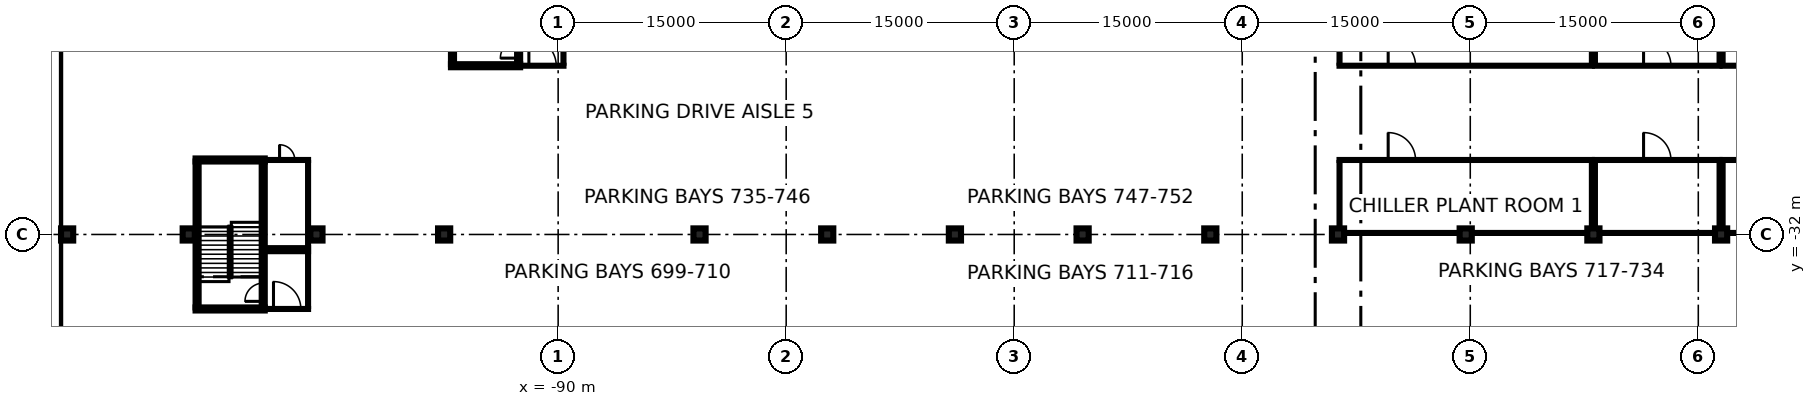
"""IFC4 building model, lengths in metres.
Left out: names, types, materials, properties, quantities, classifications, styles, units other than length and angle.
Written with IfcOpenShell. Run it as: python <this file> out.ifc"""

import sys

from ifc_helpers import new_model, si_unit, direction, frame, frame_2d, origin, origin_2d, place, context, subcontext, project, spatial, rectangle, extrude, element, fill, save


model = new_model("IFC4")
c1 = context("Model", 3, precision=1e-05, world=origin(), true_north=direction((0.0, 1.0)))
c2 = subcontext(c1, "Body", "Model", "MODEL_VIEW")
j1 = project(units=[si_unit("LENGTHUNIT", "METRE"), si_unit("PLANEANGLEUNIT", "RADIAN")], contexts=[c1])
p1 = place(None, origin())
s1 = spatial("IfcSite", under=j1, at=p1, CompositionType="ELEMENT")
p2 = place(p1, origin())
s2 = spatial("IfcBuilding", under=s1, at=p2, CompositionType="ELEMENT")
p3 = place(p2, frame((0.0, 0.0, -12.0)))
s3 = spatial("IfcBuildingStorey", under=s2, at=p3, CompositionType="ELEMENT", Elevation=-12.0)
p4 = place(p3, frame((-123.15, -80.0, 0.0), z_axis=(0.0, 0.0, 1.0), x_axis=(0.0, 1.0, 0.0)))
e1 = element("IfcWall", 1, at=p4, inside=s3, PredefinedType="USERDEFINED", context=c2, shape_type="SweptSolid", body=[
    extrude(rectangle(XDim=160.0, YDim=0.9, at=frame_2d((80.0, 0.0))), origin(), (0.0, 0.0, 1.0), 11.55),
])
p5 = place(p2, frame((0.0, 0.0, -7.2)))
s4 = spatial("IfcBuildingStorey", under=s2, at=p5, CompositionType="ELEMENT", Elevation=-7.2)
for number, where, z_axis, x_axis in (
    (2, (-122.3, -32.0, -0.4), (0.0, 0.0, 1.0), (1.0, 0.0, 0.0)),
    (3, (-114.3, -32.0, -0.4), (0.0, 0.0, 1.0), (1.0, 0.0, 0.0)),
    (4, (-105.9, -32.0, -0.4), (0.0, 0.0, 1.0), (1.0, 0.0, 0.0)),
    (5, (-97.5, -32.0, -0.4), (0.0, 0.0, 1.0), (1.0, 0.0, 0.0)),
    (6, (-80.7, -32.0, -0.4), (0.0, 0.0, 1.0), (1.0, 0.0, 0.0)),
    (7, (-72.3, -32.0, -0.4), (0.0, 0.0, 1.0), (1.0, 0.0, 0.0)),
    (8, (-63.9, -32.0, -0.4), (0.0, 0.0, 1.0), (1.0, 0.0, 0.0)),
    (9, (-55.5, -32.0, -0.4), (0.0, 0.0, 1.0), (1.0, 0.0, 0.0)),
    (10, (-47.1, -32.0, -0.4), (0.0, 0.0, 1.0), (1.0, 0.0, 0.0)),
    (11, (-38.7, -32.0, -0.4), (0.0, 0.0, 1.0), (1.0, 0.0, 0.0)),
    (12, (-30.3, -32.0, -0.4), (0.0, 0.0, 1.0), (1.0, 0.0, 0.0)),
    (13, (-21.9, -32.0, -0.4), (0.0, 0.0, 1.0), (1.0, 0.0, 0.0)),
    (14, (-13.5, -32.0, -0.4), (0.0, 0.0, 1.0), (1.0, 0.0, 0.0)),
):
    element("IfcColumn", number, at=place(p5, frame(where, z_axis=z_axis, x_axis=x_axis)), inside=s4, PredefinedType="COLUMN", context=c2, shape_type="SweptSolid", body=[
        extrude(rectangle(XDim=0.8, YDim=0.8, at=origin_2d()), origin(), (0.0, 0.0, 1.0), 3.6),
    ])
p6 = place(p5, frame((-38.7, -31.9, 0.0), z_axis=(0.0, 0.0, 1.0), x_axis=(1.0, 0.0, 0.0)))
e15 = element("IfcWall", 15, at=p6, inside=s4, PredefinedType="PARTITIONING", context=c2, shape_type="SweptSolid", body=[
    extrude(rectangle(XDim=16.8, YDim=0.2, at=frame_2d((8.4, 0.0))), origin(), (0.0, 0.0, 1.0), 3.2),
])
p7 = place(p5, frame((-38.7, -27.1, 0.0), z_axis=(0.0, 0.0, 1.0), x_axis=(1.0, 0.0, 0.0)))
e16 = element("IfcWall", 16, at=p7, inside=s4, PredefinedType="PARTITIONING", context=c2, shape_type="SweptSolid", body=[
    extrude(rectangle(XDim=16.8, YDim=0.2, at=frame_2d((8.4, 0.0))), origin(), (0.0, 0.0, 1.0), 3.2),
])
p8 = place(p7, frame((3.3, 0.0, 0.0)))
e17 = element("IfcOpeningElement", 17, at=p8, cuts=e16, PredefinedType="OPENING", context=c2, shape_type="SweptSolid", body=[
    extrude(rectangle(XDim=1.8, YDim=2.1, at=frame_2d((0.9, 1.05))), frame((0.0, 0.11, 0.0), z_axis=(0.0, -1.0, 0.0), x_axis=(1.0, 0.0, 0.0)), (0.0, 0.0, 1.0), 0.22),
])
for number, where, z_axis, x_axis in (
    (18, (-38.6, -31.6, 0.0), (0.0, 0.0, 1.0), (0.0, 1.0, 0.0)),
    (19, (-22.0, -31.6, 0.0), (0.0, 0.0, 1.0), (0.0, 1.0, 0.0)),
):
    element("IfcWall", number, at=place(p5, frame(where, z_axis=z_axis, x_axis=x_axis)), inside=s4, PredefinedType="PARTITIONING", context=c2, shape_type="SweptSolid", body=[
        extrude(rectangle(XDim=4.4, YDim=0.2, at=frame_2d((2.2, 0.0))), origin(), (0.0, 0.0, 1.0), 3.2),
    ])
p9 = place(p5, frame((-21.9, -31.9, 0.0), z_axis=(0.0, 0.0, 1.0), x_axis=(1.0, 0.0, 0.0)))
e20 = element("IfcWall", 20, at=p9, inside=s4, PredefinedType="PARTITIONING", context=c2, shape_type="SweptSolid", body=[
    extrude(rectangle(XDim=8.4, YDim=0.2, at=frame_2d((4.2, 0.0))), origin(), (0.0, 0.0, 1.0), 3.2),
])
p10 = place(p5, frame((-21.9, -27.1, 0.0), z_axis=(0.0, 0.0, 1.0), x_axis=(1.0, 0.0, 0.0)))
e21 = element("IfcWall", 21, at=p10, inside=s4, PredefinedType="PARTITIONING", context=c2, shape_type="SweptSolid", body=[
    extrude(rectangle(XDim=8.4, YDim=0.2, at=frame_2d((4.2, 0.0))), origin(), (0.0, 0.0, 1.0), 3.2),
])
p11 = place(p10, frame((3.3, 0.0, 0.0)))
e22 = element("IfcOpeningElement", 22, at=p11, cuts=e21, PredefinedType="OPENING", context=c2, shape_type="SweptSolid", body=[
    extrude(rectangle(XDim=1.8, YDim=2.1, at=frame_2d((0.9, 1.05))), frame((0.0, 0.11, 0.0), z_axis=(0.0, -1.0, 0.0), x_axis=(1.0, 0.0, 0.0)), (0.0, 0.0, 1.0), 0.22),
])
for number, where, z_axis, x_axis in (
    (23, (-21.8, -31.6, 0.0), (0.0, 0.0, 1.0), (0.0, 1.0, 0.0)),
    (24, (-13.6, -31.6, 0.0), (0.0, 0.0, 1.0), (0.0, 1.0, 0.0)),
):
    element("IfcWall", number, at=place(p5, frame(where, z_axis=z_axis, x_axis=x_axis)), inside=s4, PredefinedType="PARTITIONING", context=c2, shape_type="SweptSolid", body=[
        extrude(rectangle(XDim=4.4, YDim=0.2, at=frame_2d((2.2, 0.0))), origin(), (0.0, 0.0, 1.0), 3.2),
    ])
p12 = place(p5, frame((-13.5, -31.9, 0.0), z_axis=(0.0, 0.0, 1.0), x_axis=(1.0, 0.0, 0.0)))
e25 = element("IfcWall", 25, at=p12, inside=s4, PredefinedType="PARTITIONING", context=c2, shape_type="SweptSolid", body=[
    extrude(rectangle(XDim=25.2, YDim=0.2, at=frame_2d((12.6, 0.0))), origin(), (0.0, 0.0, 1.0), 3.2),
])
p13 = place(p5, frame((-13.5, -27.1, 0.0), z_axis=(0.0, 0.0, 1.0), x_axis=(1.0, 0.0, 0.0)))
e26 = element("IfcWall", 26, at=p13, inside=s4, PredefinedType="PARTITIONING", context=c2, shape_type="SweptSolid", body=[
    extrude(rectangle(XDim=25.2, YDim=0.2, at=frame_2d((12.6, 0.0))), origin(), (0.0, 0.0, 1.0), 3.2),
])
p14 = place(p13, frame((3.3, 0.0, 0.0)))
e27 = element("IfcOpeningElement", 27, at=p14, cuts=e26, PredefinedType="OPENING", context=c2, shape_type="SweptSolid", body=[
    extrude(rectangle(XDim=1.8, YDim=2.1, at=frame_2d((0.9, 1.05))), frame((0.0, 0.11, 0.0), z_axis=(0.0, -1.0, 0.0), x_axis=(1.0, 0.0, 0.0)), (0.0, 0.0, 1.0), 0.22),
])
p15 = place(p5, frame((-13.4, -31.6, 0.0), z_axis=(0.0, 0.0, 1.0), x_axis=(0.0, 1.0, 0.0)))
e28 = element("IfcWall", 28, at=p15, inside=s4, PredefinedType="PARTITIONING", context=c2, shape_type="SweptSolid", body=[
    extrude(rectangle(XDim=4.4, YDim=0.2, at=frame_2d((2.2, 0.0))), origin(), (0.0, 0.0, 1.0), 3.2),
])
p16 = place(p5, frame((-38.7, -20.9, 0.0), z_axis=(0.0, 0.0, 1.0), x_axis=(1.0, 0.0, 0.0)))
e29 = element("IfcWall", 29, at=p16, inside=s4, PredefinedType="PARTITIONING", context=c2, shape_type="SweptSolid", body=[
    extrude(rectangle(XDim=16.8, YDim=0.2, at=frame_2d((8.4, 0.0))), origin(), (0.0, 0.0, 1.0), 3.2),
])
p17 = place(p16, frame((3.3, 0.0, 0.0)))
e30 = element("IfcOpeningElement", 30, at=p17, cuts=e29, PredefinedType="OPENING", context=c2, shape_type="SweptSolid", body=[
    extrude(rectangle(XDim=1.8, YDim=2.1, at=frame_2d((0.9, 1.05))), frame((0.0, 0.11, 0.0), z_axis=(0.0, -1.0, 0.0), x_axis=(1.0, 0.0, 0.0)), (0.0, 0.0, 1.0), 0.22),
])
for number, where, z_axis, x_axis in (
    (31, (-38.6, -20.8, 0.0), (0.0, 0.0, 1.0), (0.0, 1.0, 0.0)),
    (32, (-22.0, -20.8, 0.0), (0.0, 0.0, 1.0), (0.0, 1.0, 0.0)),
):
    element("IfcWall", number, at=place(p5, frame(where, z_axis=z_axis, x_axis=x_axis)), inside=s4, PredefinedType="PARTITIONING", context=c2, shape_type="SweptSolid", body=[
        extrude(rectangle(XDim=4.2, YDim=0.2, at=frame_2d((2.1, 0.0))), origin(), (0.0, 0.0, 1.0), 3.2),
    ])
p18 = place(p5, frame((-21.9, -20.9, 0.0), z_axis=(0.0, 0.0, 1.0), x_axis=(1.0, 0.0, 0.0)))
e33 = element("IfcWall", 33, at=p18, inside=s4, PredefinedType="PARTITIONING", context=c2, shape_type="SweptSolid", body=[
    extrude(rectangle(XDim=8.4, YDim=0.2, at=frame_2d((4.2, 0.0))), origin(), (0.0, 0.0, 1.0), 3.2),
])
p19 = place(p18, frame((3.3, 0.0, 0.0)))
e34 = element("IfcOpeningElement", 34, at=p19, cuts=e33, PredefinedType="OPENING", context=c2, shape_type="SweptSolid", body=[
    extrude(rectangle(XDim=1.8, YDim=2.1, at=frame_2d((0.9, 1.05))), frame((0.0, 0.11, 0.0), z_axis=(0.0, -1.0, 0.0), x_axis=(1.0, 0.0, 0.0)), (0.0, 0.0, 1.0), 0.22),
])
for number, where, z_axis, x_axis in (
    (35, (-21.8, -20.8, 0.0), (0.0, 0.0, 1.0), (0.0, 1.0, 0.0)),
    (36, (-13.6, -20.8, 0.0), (0.0, 0.0, 1.0), (0.0, 1.0, 0.0)),
):
    element("IfcWall", number, at=place(p5, frame(where, z_axis=z_axis, x_axis=x_axis)), inside=s4, PredefinedType="PARTITIONING", context=c2, shape_type="SweptSolid", body=[
        extrude(rectangle(XDim=4.2, YDim=0.2, at=frame_2d((2.1, 0.0))), origin(), (0.0, 0.0, 1.0), 3.2),
    ])
p20 = place(p5, frame((-13.5, -20.9, 0.0), z_axis=(0.0, 0.0, 1.0), x_axis=(1.0, 0.0, 0.0)))
e37 = element("IfcWall", 37, at=p20, inside=s4, PredefinedType="PARTITIONING", context=c2, shape_type="SweptSolid", body=[
    extrude(rectangle(XDim=8.4, YDim=0.2, at=frame_2d((4.2, 0.0))), origin(), (0.0, 0.0, 1.0), 3.2),
])
p21 = place(p20, frame((3.3, 0.0, 0.0)))
e38 = element("IfcOpeningElement", 38, at=p21, cuts=e37, PredefinedType="OPENING", context=c2, shape_type="SweptSolid", body=[
    extrude(rectangle(XDim=1.8, YDim=2.1, at=frame_2d((0.9, 1.05))), frame((0.0, 0.11, 0.0), z_axis=(0.0, -1.0, 0.0), x_axis=(1.0, 0.0, 0.0)), (0.0, 0.0, 1.0), 0.22),
])
p22 = place(p5, frame((-13.4, -20.8, 0.0), z_axis=(0.0, 0.0, 1.0), x_axis=(0.0, 1.0, 0.0)))
e39 = element("IfcWall", 39, at=p22, inside=s4, PredefinedType="PARTITIONING", context=c2, shape_type="SweptSolid", body=[
    extrude(rectangle(XDim=4.2, YDim=0.2, at=frame_2d((2.1, 0.0))), origin(), (0.0, 0.0, 1.0), 3.2),
])
p23 = place(p5, frame((-109.3, -36.9, 0.0), z_axis=(0.0, 0.0, 1.0), x_axis=(1.0, 0.0, 0.0)))
e40 = element("IfcWall", 40, at=p23, inside=s4, PredefinedType="PARTITIONING", context=c2, shape_type="SweptSolid", body=[
    extrude(rectangle(XDim=2.95, YDim=0.2, at=frame_2d((1.475, 0.0))), origin(), (0.0, 0.0, 1.0), 3.2),
])
p24 = place(p23, frame((0.575, 0.0, 0.0)))
e41 = element("IfcOpeningElement", 41, at=p24, cuts=e40, PredefinedType="OPENING", context=c2, shape_type="SweptSolid", body=[
    extrude(rectangle(XDim=1.8, YDim=2.1, at=frame_2d((0.9, 1.05))), frame((0.0, 0.11, 0.0), z_axis=(0.0, -1.0, 0.0), x_axis=(1.0, 0.0, 0.0)), (0.0, 0.0, 1.0), 0.22),
])
p25 = place(p5, frame((-109.3, -33.1, 0.0), z_axis=(0.0, 0.0, 1.0), x_axis=(1.0, 0.0, 0.0)))
e42 = element("IfcWall", 42, at=p25, inside=s4, PredefinedType="PARTITIONING", context=c2, shape_type="SweptSolid", body=[
    extrude(rectangle(XDim=2.95, YDim=0.2, at=frame_2d((1.475, 0.0))), origin(), (0.0, 0.0, 1.0), 3.2),
])
p26 = place(p5, frame((-106.45, -36.8, 0.0), z_axis=(0.0, 0.0, 1.0), x_axis=(0.0, 1.0, 0.0)))
e43 = element("IfcWall", 43, at=p26, inside=s4, PredefinedType="PARTITIONING", context=c2, shape_type="SweptSolid", body=[
    extrude(rectangle(XDim=3.6, YDim=0.2, at=frame_2d((1.8, 0.0))), origin(), (0.0, 0.0, 1.0), 3.2),
])
p27 = place(p5, frame((-109.3, -32.9, 0.0), z_axis=(0.0, 0.0, 1.0), x_axis=(1.0, 0.0, 0.0)))
e44 = element("IfcWall", 44, at=p27, inside=s4, PredefinedType="PARTITIONING", context=c2, shape_type="SweptSolid", body=[
    extrude(rectangle(XDim=2.95, YDim=0.2, at=frame_2d((1.475, 0.0))), origin(), (0.0, 0.0, 1.0), 3.2),
])
p28 = place(p5, frame((-109.3, -27.1, 0.0), z_axis=(0.0, 0.0, 1.0), x_axis=(1.0, 0.0, 0.0)))
e45 = element("IfcWall", 45, at=p28, inside=s4, PredefinedType="PARTITIONING", context=c2, shape_type="SweptSolid", body=[
    extrude(rectangle(XDim=2.95, YDim=0.2, at=frame_2d((1.475, 0.0))), origin(), (0.0, 0.0, 1.0), 3.2),
])
p29 = place(p28, frame((0.975, 0.0, 0.0)))
e46 = element("IfcOpeningElement", 46, at=p29, cuts=e45, PredefinedType="OPENING", context=c2, shape_type="SweptSolid", body=[
    extrude(rectangle(XDim=1.0, YDim=2.1, at=frame_2d((0.5, 1.05))), frame((0.0, 0.11, 0.0), z_axis=(0.0, -1.0, 0.0), x_axis=(1.0, 0.0, 0.0)), (0.0, 0.0, 1.0), 0.22),
])
p30 = place(p5, frame((-106.45, -32.8, 0.0), z_axis=(0.0, 0.0, 1.0), x_axis=(0.0, 1.0, 0.0)))
e47 = element("IfcWall", 47, at=p30, inside=s4, PredefinedType="PARTITIONING", context=c2, shape_type="SweptSolid", body=[
    extrude(rectangle(XDim=5.6, YDim=0.2, at=frame_2d((2.8, 0.0))), origin(), (0.0, 0.0, 1.0), 3.2),
])
p31 = place(p5, frame((-92.5, -20.9, 0.0), z_axis=(0.0, 0.0, 1.0), x_axis=(1.0, 0.0, 0.0)))
e48 = element("IfcWall", 48, at=p31, inside=s4, PredefinedType="PARTITIONING", context=c2, shape_type="SweptSolid", body=[
    extrude(rectangle(XDim=2.95, YDim=0.2, at=frame_2d((1.475, 0.0))), origin(), (0.0, 0.0, 1.0), 3.2),
])
p32 = place(p31, frame((0.575, 0.0, 0.0)))
e49 = element("IfcOpeningElement", 49, at=p32, cuts=e48, PredefinedType="OPENING", context=c2, shape_type="SweptSolid", body=[
    extrude(rectangle(XDim=1.8, YDim=2.1, at=frame_2d((0.9, 1.05))), frame((0.0, 0.11, 0.0), z_axis=(0.0, -1.0, 0.0), x_axis=(1.0, 0.0, 0.0)), (0.0, 0.0, 1.0), 0.22),
])
p33 = place(p5, frame((-89.65, -20.8, 0.0), z_axis=(0.0, 0.0, 1.0), x_axis=(0.0, 1.0, 0.0)))
e50 = element("IfcWall", 50, at=p33, inside=s4, PredefinedType="PARTITIONING", context=c2, shape_type="SweptSolid", body=[
    extrude(rectangle(XDim=3.6, YDim=0.2, at=frame_2d((1.8, 0.0))), origin(), (0.0, 0.0, 1.0), 3.2),
])
p34 = place(p5, frame((-113.75, -36.8, 0.0), z_axis=(0.0, 0.0, 1.0), x_axis=(0.0, 1.0, 0.0)))
e51 = element("IfcWall", 51, at=p34, inside=s4, PredefinedType="SOLIDWALL", context=c2, shape_type="SweptSolid", body=[
    extrude(rectangle(XDim=9.6, YDim=0.2, at=frame_2d((4.8, 0.0))), origin(), (0.0, 0.0, 1.0), 3.2),
])
p35 = place(p5, frame((-109.4, -36.8, 0.0), z_axis=(0.0, 0.0, 1.0), x_axis=(0.0, 1.0, 0.0)))
e52 = element("IfcWall", 52, at=p35, inside=s4, PredefinedType="SOLIDWALL", context=c2, shape_type="SweptSolid", body=[
    extrude(rectangle(XDim=9.6, YDim=0.2, at=frame_2d((4.8, 0.0))), origin(), (0.0, 0.0, 1.0), 3.2),
])
p36 = place(p35, frame((0.4, 0.0, 0.0)))
e53 = element("IfcOpeningElement", 53, at=p36, cuts=e52, PredefinedType="OPENING", context=c2, shape_type="SweptSolid", body=[
    extrude(rectangle(XDim=1.2, YDim=2.1, at=frame_2d((0.6, 1.05))), frame((0.0, 0.11, 0.0), z_axis=(0.0, -1.0, 0.0), x_axis=(1.0, 0.0, 0.0)), (0.0, 0.0, 1.0), 0.22),
])
for number, where, z_axis, x_axis in (
    (54, (-109.3, -36.9, 0.0), (0.0, 0.0, 1.0), (-1.0, 0.0, 0.0)),
    (55, (-113.85, -27.1, 0.0), (0.0, 0.0, 1.0), (1.0, 0.0, 0.0)),
):
    element("IfcWall", number, at=place(p5, frame(where, z_axis=z_axis, x_axis=x_axis)), inside=s4, PredefinedType="SOLIDWALL", context=c2, shape_type="SweptSolid", body=[
        extrude(rectangle(XDim=4.55, YDim=0.2, at=frame_2d((2.275, 0.0))), origin(), (0.0, 0.0, 1.0), 3.2),
    ])
p37 = place(p5, frame((-96.95, -20.8, 0.0), z_axis=(0.0, 0.0, 1.0), x_axis=(0.0, 1.0, 0.0)))
e56 = element("IfcWall", 56, at=p37, inside=s4, PredefinedType="SOLIDWALL", context=c2, shape_type="SweptSolid", body=[
    extrude(rectangle(XDim=9.6, YDim=0.2, at=frame_2d((4.8, 0.0))), origin(), (0.0, 0.0, 1.0), 3.2),
])
p38 = place(p5, frame((-92.6, -20.8, 0.0), z_axis=(0.0, 0.0, 1.0), x_axis=(0.0, 1.0, 0.0)))
e57 = element("IfcWall", 57, at=p38, inside=s4, PredefinedType="SOLIDWALL", context=c2, shape_type="SweptSolid", body=[
    extrude(rectangle(XDim=9.6, YDim=0.2, at=frame_2d((4.8, 0.0))), origin(), (0.0, 0.0, 1.0), 3.2),
])
p39 = place(p38, frame((0.4, 0.0, 0.0)))
e58 = element("IfcOpeningElement", 58, at=p39, cuts=e57, PredefinedType="OPENING", context=c2, shape_type="SweptSolid", body=[
    extrude(rectangle(XDim=1.2, YDim=2.1, at=frame_2d((0.6, 1.05))), frame((0.0, 0.11, 0.0), z_axis=(0.0, -1.0, 0.0), x_axis=(1.0, 0.0, 0.0)), (0.0, 0.0, 1.0), 0.22),
])
p40 = place(p5, frame((-92.5, -20.9, 0.0), z_axis=(0.0, 0.0, 1.0), x_axis=(-1.0, 0.0, 0.0)))
e59 = element("IfcWall", 59, at=p40, inside=s4, PredefinedType="SOLIDWALL", context=c2, shape_type="SweptSolid", body=[
    extrude(rectangle(XDim=4.55, YDim=0.2, at=frame_2d((2.275, 0.0))), origin(), (0.0, 0.0, 1.0), 3.2),
])
p41 = place(p8, origin())
e60 = element("IfcDoor", 60, at=p41, inside=s4, OperationType="DOUBLE_DOOR_SINGLE_SWING", PredefinedType="DOOR", context=c2, shape_type="SweptSolid", body=[
    extrude(rectangle(XDim=1.8, YDim=2.1, at=frame_2d((0.9, 1.05))), frame((0.0, 0.025, 0.0), z_axis=(0.0, -1.0, 0.0), x_axis=(1.0, 0.0, 0.0)), (0.0, 0.0, 1.0), 0.05),
])
fill(e17, e60)
p42 = place(p11, origin())
e61 = element("IfcDoor", 61, at=p42, inside=s4, OperationType="DOUBLE_DOOR_SINGLE_SWING", PredefinedType="DOOR", context=c2, shape_type="SweptSolid", body=[
    extrude(rectangle(XDim=1.8, YDim=2.1, at=frame_2d((0.9, 1.05))), frame((0.0, 0.025, 0.0), z_axis=(0.0, -1.0, 0.0), x_axis=(1.0, 0.0, 0.0)), (0.0, 0.0, 1.0), 0.05),
])
fill(e22, e61)
p43 = place(p17, origin())
e62 = element("IfcDoor", 62, at=p43, inside=s4, OperationType="DOUBLE_DOOR_SINGLE_SWING", PredefinedType="DOOR", context=c2, shape_type="SweptSolid", body=[
    extrude(rectangle(XDim=1.8, YDim=2.1, at=frame_2d((0.9, 1.05))), frame((0.0, 0.025, 0.0), z_axis=(0.0, -1.0, 0.0), x_axis=(1.0, 0.0, 0.0)), (0.0, 0.0, 1.0), 0.05),
])
fill(e30, e62)
p44 = place(p19, origin())
e63 = element("IfcDoor", 63, at=p44, inside=s4, OperationType="DOUBLE_DOOR_SINGLE_SWING", PredefinedType="DOOR", context=c2, shape_type="SweptSolid", body=[
    extrude(rectangle(XDim=1.8, YDim=2.1, at=frame_2d((0.9, 1.05))), frame((0.0, 0.025, 0.0), z_axis=(0.0, -1.0, 0.0), x_axis=(1.0, 0.0, 0.0)), (0.0, 0.0, 1.0), 0.05),
])
fill(e34, e63)
p45 = place(p24, origin())
e64 = element("IfcDoor", 64, at=p45, inside=s4, OperationType="DOUBLE_DOOR_SINGLE_SWING", PredefinedType="DOOR", context=c2, shape_type="SweptSolid", body=[
    extrude(rectangle(XDim=1.8, YDim=2.1, at=frame_2d((0.9, 1.05))), frame((0.0, 0.025, 0.0), z_axis=(0.0, -1.0, 0.0), x_axis=(1.0, 0.0, 0.0)), (0.0, 0.0, 1.0), 0.05),
])
fill(e41, e64)
p46 = place(p29, origin())
e65 = element("IfcDoor", 65, at=p46, inside=s4, OperationType="SINGLE_SWING_LEFT", PredefinedType="DOOR", context=c2, shape_type="SweptSolid", body=[
    extrude(rectangle(XDim=1.0, YDim=2.1, at=frame_2d((0.5, 1.05))), frame((0.0, 0.025, 0.0), z_axis=(0.0, -1.0, 0.0), x_axis=(1.0, 0.0, 0.0)), (0.0, 0.0, 1.0), 0.05),
])
fill(e46, e65)
p47 = place(p32, origin())
e66 = element("IfcDoor", 66, at=p47, inside=s4, OperationType="DOUBLE_DOOR_SINGLE_SWING", PredefinedType="DOOR", context=c2, shape_type="SweptSolid", body=[
    extrude(rectangle(XDim=1.8, YDim=2.1, at=frame_2d((0.9, 1.05))), frame((0.0, 0.025, 0.0), z_axis=(0.0, -1.0, 0.0), x_axis=(1.0, 0.0, 0.0)), (0.0, 0.0, 1.0), 0.05),
])
fill(e49, e66)
p48 = place(p36, origin())
e67 = element("IfcDoor", 67, at=p48, inside=s4, OperationType="SINGLE_SWING_LEFT", PredefinedType="DOOR", context=c2, shape_type="SweptSolid", body=[
    extrude(rectangle(XDim=1.2, YDim=2.1, at=frame_2d((0.6, 1.05))), frame((0.0, 0.025, 0.0), z_axis=(0.0, -1.0, 0.0), x_axis=(1.0, 0.0, 0.0)), (0.0, 0.0, 1.0), 0.05),
])
fill(e53, e67)
p49 = place(p39, origin())
e68 = element("IfcDoor", 68, at=p49, inside=s4, OperationType="SINGLE_SWING_LEFT", PredefinedType="DOOR", context=c2, shape_type="SweptSolid", body=[
    extrude(rectangle(XDim=1.2, YDim=2.1, at=frame_2d((0.6, 1.05))), frame((0.0, 0.025, 0.0), z_axis=(0.0, -1.0, 0.0), x_axis=(1.0, 0.0, 0.0)), (0.0, 0.0, 1.0), 0.05),
])
fill(e58, e68)
save(model, sys.argv[1])
